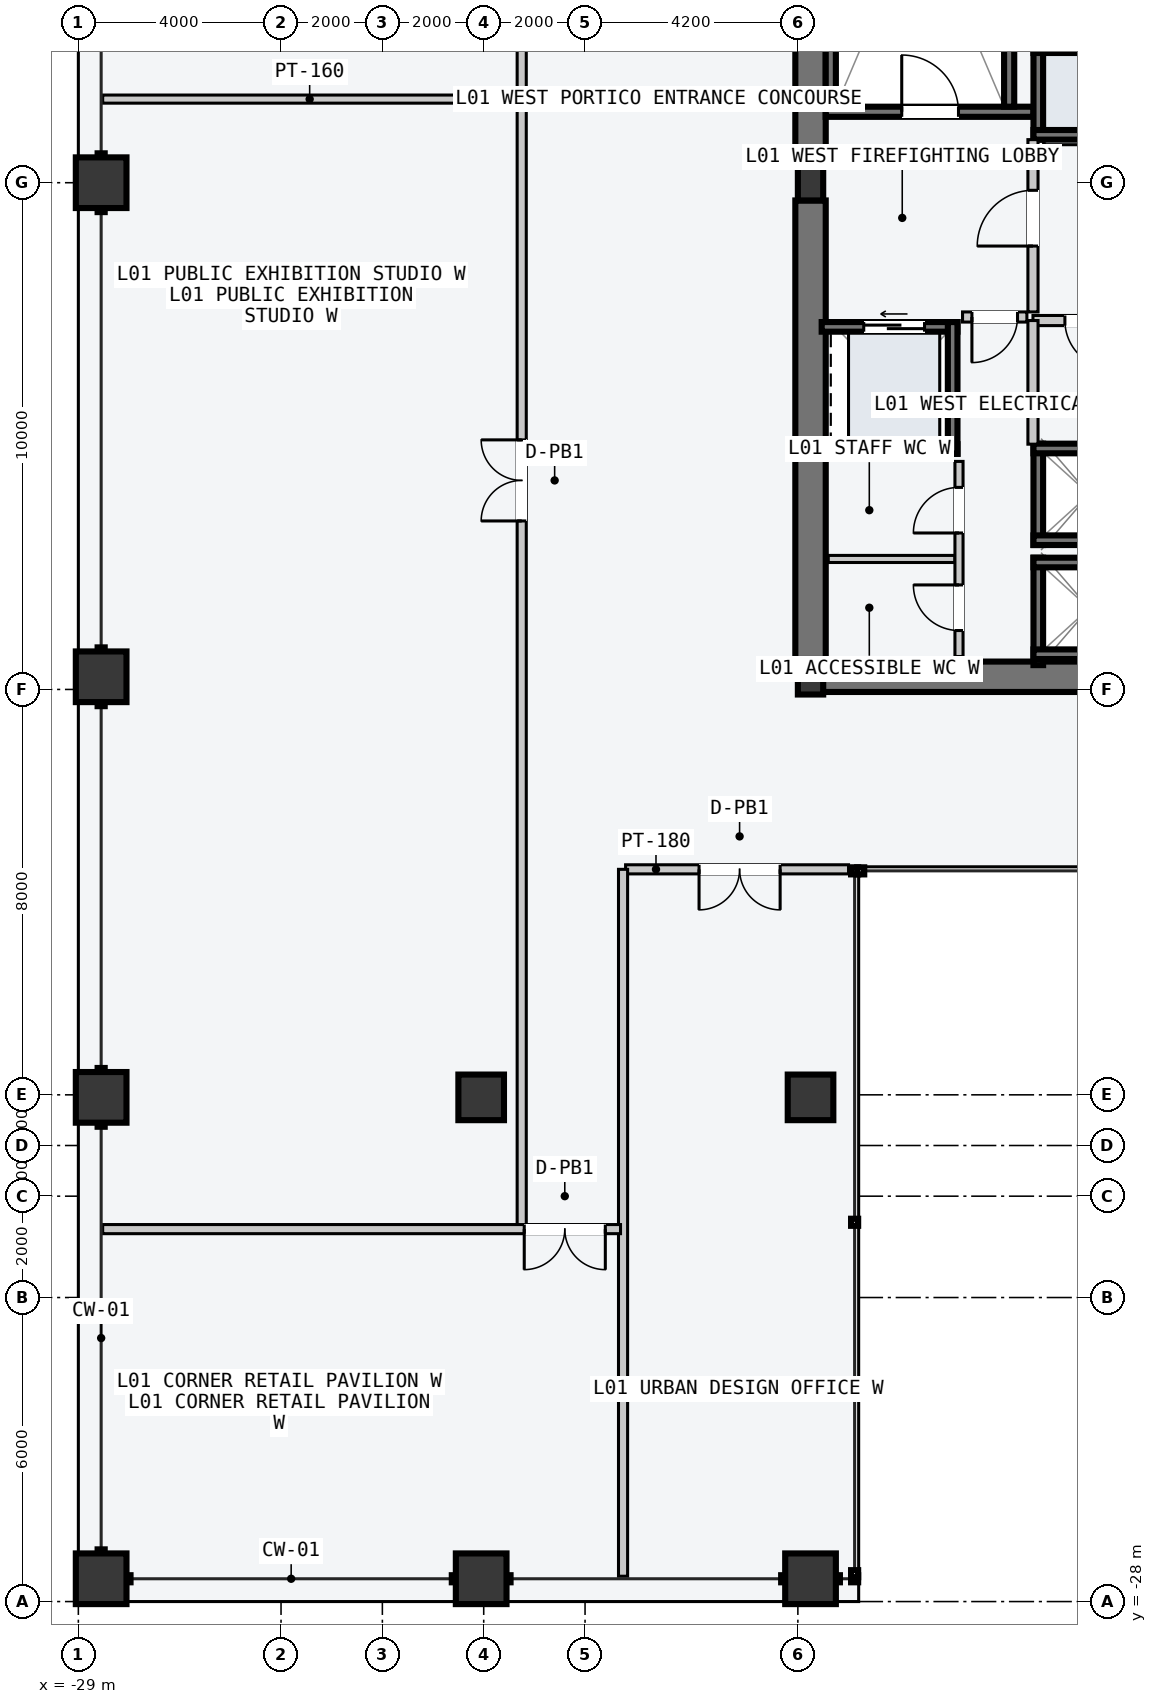
"""IFC4 building model, lengths in metres.
Left out: names, types, materials, properties, quantities, classifications, styles, units other than length and angle.
Written with IfcOpenShell. Run it as: python <this file> out.ifc"""

import sys

from ifc_helpers import new_model, si_unit, direction, frame, frame_2d, origin, origin_2d, place, context, subcontext, project, spatial, rectangle, hollow_rectangle, i_section, extrude, element, fill, save


model = new_model("IFC4")
c1 = context("Model", 3, precision=1e-05, world=origin(), true_north=direction((0.0, 1.0)))
c2 = subcontext(c1, "Body", "Model", "MODEL_VIEW")
j1 = project(units=[si_unit("LENGTHUNIT", "METRE"), si_unit("PLANEANGLEUNIT", "RADIAN")], contexts=[c1])
p1 = place(None, origin())
s1 = spatial("IfcSite", under=j1, at=p1, CompositionType="ELEMENT")
p2 = place(p1, origin())
s2 = spatial("IfcBuilding", under=s1, at=p2, CompositionType="ELEMENT")
p3 = place(p2, frame((0.0, 0.0, 4.8)))
s3 = spatial("IfcBuildingStorey", under=s2, at=p3, CompositionType="ELEMENT", Elevation=4.8)
p4 = place(p3, frame((-14.53, -9.75, -0.22), z_axis=(0.0, 0.0, 1.0), x_axis=(1.0, 0.0, 0.0)))
e1 = element("IfcWall", 1, at=p4, inside=s3, PredefinedType="SHEAR", context=c2, shape_type="SweptSolid", body=[
    extrude(rectangle(XDim=6.46, YDim=0.6, at=frame_2d((3.23, 0.0))), origin(), (0.0, 0.0, 1.0), 4.8),
])
for number, where, z_axis, x_axis in (
    (2, (-14.55, -9.4, -0.22), (0.0, 0.0, 1.0), (0.0, 1.0, 0.0)),
    (3, (-14.55, 0.35, -0.22), (0.0, 0.0, 1.0), (0.0, 1.0, 0.0)),
):
    element("IfcWall", number, at=place(p3, frame(where, z_axis=z_axis, x_axis=x_axis)), inside=s3, PredefinedType="SHEAR", context=c2, shape_type="SweptSolid", body=[
        extrude(rectangle(XDim=9.05, YDim=0.6, at=frame_2d((4.525, 0.0))), origin(), (0.0, 0.0, 1.0), 4.8),
    ])
p5 = place(p3, frame((-14.15, 1.5, -0.22), z_axis=(0.0, 0.0, 1.0), x_axis=(0.0, 1.0, 0.0)))
e4 = element("IfcWall", 4, at=p5, inside=s3, PredefinedType="SOLIDWALL", context=c2, shape_type="SweptSolid", body=[
    extrude(rectangle(XDim=7.8, YDim=0.2, at=frame_2d((3.9, 0.0))), origin(), (0.0, 0.0, 1.0), 4.8),
])
p6 = place(p3, frame((-14.25, 1.4, -0.22), z_axis=(0.0, 0.0, 1.0), x_axis=(1.0, 0.0, 0.0)))
e5 = element("IfcWall", 5, at=p6, inside=s3, PredefinedType="SOLIDWALL", context=c2, shape_type="SweptSolid", body=[
    extrude(rectangle(XDim=4.1, YDim=0.2, at=frame_2d((2.05, 0.0))), origin(), (0.0, 0.0, 1.0), 4.8),
])
p7 = place(p6, frame((1.5, 0.0, 0.22)))
e6 = element("IfcOpeningElement", 6, at=p7, cuts=e5, PredefinedType="OPENING", context=c2, shape_type="SweptSolid", body=[
    extrude(rectangle(XDim=1.12, YDim=2.18, at=frame_2d((0.56, 1.09))), frame((0.0, 0.11, 0.0), z_axis=(0.0, -1.0, 0.0), x_axis=(1.0, 0.0, 0.0)), (0.0, 0.0, 1.0), 0.22),
])
p8 = place(p3, frame((-10.63, 1.5, -0.22), z_axis=(0.0, 0.0, 1.0), x_axis=(0.0, 1.0, 0.0)))
e7 = element("IfcWall", 7, at=p8, inside=s3, PredefinedType="SOLIDWALL", context=c2, shape_type="SweptSolid", body=[
    extrude(rectangle(XDim=7.8, YDim=0.2, at=frame_2d((3.9, 0.0))), origin(), (0.0, 0.0, 1.0), 4.8),
])
for number, where, z_axis, x_axis in (
    (8, (-14.55, -9.75, 0.0), (0.0, 0.0, 1.0), (1.0, 0.0, 0.0)),
    (9, (-14.55, 0.0, 0.0), (0.0, 0.0, 1.0), (1.0, 0.0, 0.0)),
):
    element("IfcColumn", number, at=place(p3, frame(where, z_axis=z_axis, x_axis=x_axis)), inside=s3, PredefinedType="COLUMN", context=c2, shape_type="SweptSolid", body=[
        extrude(i_section(OverallWidth=0.5, OverallDepth=0.7, WebThickness=0.028, FlangeThickness=0.045, at=origin_2d()), origin(), (0.0, 0.0, 1.0), 4.8),
    ])
for number, where, z_axis, x_axis in (
    (10, (-21.05, -18.05, 0.0), (0.0, 0.0, 1.0), (1.0, 0.0, 0.0)),
    (11, (-14.55, -18.05, 0.0), (0.0, 0.0, 1.0), (1.0, 0.0, 0.0)),
):
    element("IfcColumn", number, at=place(p3, frame(where, z_axis=z_axis, x_axis=x_axis)), inside=s3, PredefinedType="COLUMN", context=c2, shape_type="SweptSolid", body=[
        extrude(hollow_rectangle(XDim=0.9, YDim=0.9, WallThickness=0.045, at=origin_2d()), origin(), (0.0, 0.0, 1.0), 4.8),
    ])
for number, where, z_axis, x_axis in (
    (12, (-28.55, -27.55, 0.0), (0.0, 0.0, 1.0), (1.0, 0.0, 0.0)),
    (13, (-21.05, -27.55, 0.0), (0.0, 0.0, 1.0), (1.0, 0.0, 0.0)),
    (14, (-14.55, -27.55, 0.0), (0.0, 0.0, 1.0), (1.0, 0.0, 0.0)),
    (15, (-28.55, -18.05, 0.0), (0.0, 0.0, 1.0), (0.0, 1.0, 0.0)),
    (16, (-28.55, -9.75, 0.0), (0.0, 0.0, 1.0), (0.0, 1.0, 0.0)),
    (17, (-28.55, 0.0, 0.0), (0.0, 0.0, 1.0), (0.0, 1.0, 0.0)),
):
    element("IfcColumn", number, at=place(p3, frame(where, z_axis=z_axis, x_axis=x_axis)), inside=s3, PredefinedType="COLUMN", context=c2, shape_type="SweptSolid", body=[
        extrude(hollow_rectangle(XDim=1.0, YDim=1.0, WallThickness=0.05, at=origin_2d()), origin(), (0.0, 0.0, 1.0), 4.8),
    ])
p9 = place(p3, frame((-10.055, 0.85, -0.22), z_axis=(0.0, 0.0, 1.0), x_axis=(0.0, 1.0, 0.0)))
e18 = element("IfcWall", 18, at=p9, inside=s3, PredefinedType="SOLIDWALL", context=c2, shape_type="SweptSolid", body=[
    extrude(rectangle(XDim=1.9, YDim=0.19, at=frame_2d((0.95, 0.0))), origin(), (0.0, 0.0, 1.0), 4.8),
])
for number, where, z_axis, x_axis in (
    (19, (-10.15, 2.655, -0.22), (0.0, 0.0, 1.0), (1.0, 0.0, 0.0)),
    (20, (-10.15, 0.945, -0.22), (0.0, 0.0, 1.0), (1.0, 0.0, 0.0)),
):
    element("IfcWall", number, at=place(p3, frame(where, z_axis=z_axis, x_axis=x_axis)), inside=s3, PredefinedType="SOLIDWALL", context=c2, shape_type="SweptSolid", body=[
        extrude(rectangle(XDim=2.2, YDim=0.19, at=frame_2d((1.1, 0.0))), origin(), (0.0, 0.0, 1.0), 4.8),
    ])
p10 = place(p3, frame((-10.055, -9.52, -0.22), z_axis=(0.0, 0.0, 1.0), x_axis=(0.0, 1.0, 0.0)))
e21 = element("IfcWall", 21, at=p10, inside=s3, PredefinedType="SOLIDWALL", context=c2, shape_type="SweptSolid", body=[
    extrude(rectangle(XDim=2.12, YDim=0.19, at=frame_2d((1.06, 0.0))), origin(), (0.0, 0.0, 1.0), 4.8),
])
for number, where, z_axis, x_axis in (
    (22, (-10.15, -7.495, -0.22), (0.0, 0.0, 1.0), (1.0, 0.0, 0.0)),
    (23, (-10.15, -9.305, -0.22), (0.0, 0.0, 1.0), (1.0, 0.0, 0.0)),
):
    element("IfcWall", number, at=place(p3, frame(where, z_axis=z_axis, x_axis=x_axis)), inside=s3, PredefinedType="SOLIDWALL", context=c2, shape_type="SweptSolid", body=[
        extrude(rectangle(XDim=2.2, YDim=0.19, at=frame_2d((1.1, 0.0))), origin(), (0.0, 0.0, 1.0), 4.8),
    ])
p11 = place(p3, frame((-10.055, -7.15, -0.22), z_axis=(0.0, 0.0, 1.0), x_axis=(0.0, 1.0, 0.0)))
e24 = element("IfcWall", 24, at=p11, inside=s3, PredefinedType="SOLIDWALL", context=c2, shape_type="SweptSolid", body=[
    extrude(rectangle(XDim=2.0, YDim=0.19, at=frame_2d((1.0, 0.0))), origin(), (0.0, 0.0, 1.0), 4.8),
])
for number, where, z_axis, x_axis in (
    (25, (-10.15, -5.245, -0.22), (0.0, 0.0, 1.0), (1.0, 0.0, 0.0)),
    (26, (-10.15, -7.055, -0.22), (0.0, 0.0, 1.0), (1.0, 0.0, 0.0)),
):
    element("IfcWall", number, at=place(p3, frame(where, z_axis=z_axis, x_axis=x_axis)), inside=s3, PredefinedType="SOLIDWALL", context=c2, shape_type="SweptSolid", body=[
        extrude(rectangle(XDim=2.2, YDim=0.19, at=frame_2d((1.1, 0.0))), origin(), (0.0, 0.0, 1.0), 4.8),
    ])
p12 = place(p3, frame((-14.33, -2.845, -0.22), z_axis=(0.0, 0.0, 1.0), x_axis=(1.0, 0.0, 0.0)))
e27 = element("IfcWall", 27, at=p12, inside=s3, PredefinedType="SOLIDWALL", context=c2, shape_type="SweptSolid", body=[
    extrude(rectangle(XDim=2.68, YDim=0.19, at=frame_2d((1.34, 0.0))), origin(), (0.0, 0.0, 1.0), 4.8),
])
p13 = place(p12, frame((0.83, 0.0, 0.22)))
e28 = element("IfcOpeningElement", 28, at=p13, cuts=e27, PredefinedType="OPENING", context=c2, shape_type="SweptSolid", body=[
    extrude(rectangle(XDim=1.2, YDim=2.2, at=frame_2d((0.6, 1.1))), frame((0.0, 0.105, 0.0), z_axis=(0.0, -1.0, 0.0), x_axis=(1.0, 0.0, 0.0)), (0.0, 0.0, 1.0), 0.21),
])
p14 = place(p3, frame((-14.33, -5.255, -0.22), z_axis=(0.0, 0.0, 1.0), x_axis=(1.0, 0.0, 0.0)))
e29 = element("IfcWall", 29, at=p14, inside=s3, PredefinedType="SOLIDWALL", context=c2, shape_type="SweptSolid", body=[
    extrude(rectangle(XDim=2.68, YDim=0.19, at=frame_2d((1.34, 0.0))), origin(), (0.0, 0.0, 1.0), 4.8),
])
p15 = place(p3, frame((-11.745, -5.35, -0.22), z_axis=(0.0, 0.0, 1.0), x_axis=(0.0, 1.0, 0.0)))
e30 = element("IfcWall", 30, at=p15, inside=s3, PredefinedType="SOLIDWALL", context=c2, shape_type="SweptSolid", body=[
    extrude(rectangle(XDim=2.6, YDim=0.19, at=frame_2d((1.3, 0.0))), origin(), (0.0, 0.0, 1.0), 4.8),
])
p16 = place(p3, frame((-10.16, -2.55, 0.0), z_axis=(0.0, 0.0, 1.0), x_axis=(0.0, 1.0, 0.0)))
e31 = element("IfcWall", 31, at=p16, inside=s3, PredefinedType="PARTITIONING", context=c2, shape_type="SweptSolid", body=[
    extrude(rectangle(XDim=3.4, YDim=0.2, at=frame_2d((1.7, 0.0))), origin(), (0.0, 0.0, 1.0), 4.58),
])
p17 = place(p16, frame((1.3, 0.0, 0.0)))
e32 = element("IfcOpeningElement", 32, at=p17, cuts=e31, PredefinedType="OPENING", context=c2, shape_type="SweptSolid", body=[
    extrude(rectangle(XDim=1.1, YDim=2.15, at=frame_2d((0.55, 1.075))), frame((0.0, 0.11, 0.0), z_axis=(0.0, -1.0, 0.0), x_axis=(1.0, 0.0, 0.0)), (0.0, 0.0, 1.0), 0.22),
])
p18 = place(p3, frame((-10.28, -2.65, 0.0), z_axis=(0.0, 0.0, 1.0), x_axis=(-1.0, 0.0, 0.0)))
e33 = element("IfcWall", 33, at=p18, inside=s3, PredefinedType="PARTITIONING", context=c2, shape_type="SweptSolid", body=[
    extrude(rectangle(XDim=1.27, YDim=0.2, at=frame_2d((0.635, 0.0))), origin(), (0.0, 0.0, 1.0), 4.58),
])
p19 = place(p18, frame((0.185, 0.0, 0.0)))
e34 = element("IfcOpeningElement", 34, at=p19, cuts=e33, PredefinedType="OPENING", context=c2, shape_type="SweptSolid", body=[
    extrude(rectangle(XDim=0.9, YDim=2.15, at=frame_2d((0.45, 1.075))), frame((0.0, 0.11, 0.0), z_axis=(0.0, -1.0, 0.0), x_axis=(1.0, 0.0, 0.0)), (0.0, 0.0, 1.0), 0.22),
])
p20 = place(p3, frame((-7.96, -2.72, 0.0), z_axis=(0.0, 0.0, 1.0), x_axis=(-1.0, 0.0, 0.0)))
e35 = element("IfcWall", 35, at=p20, inside=s3, PredefinedType="PARTITIONING", context=c2, shape_type="SweptSolid", body=[
    extrude(rectangle(XDim=2.2, YDim=0.2, at=frame_2d((1.1, 0.0))), origin(), (0.0, 0.0, 1.0), 4.58),
])
p21 = place(p20, frame((0.62, 0.0, 0.0)))
e36 = element("IfcOpeningElement", 36, at=p21, cuts=e35, PredefinedType="OPENING", context=c2, shape_type="SweptSolid", body=[
    extrude(rectangle(XDim=0.95, YDim=2.1, at=frame_2d((0.475, 1.05))), frame((0.0, 0.11, 0.0), z_axis=(0.0, -1.0, 0.0), x_axis=(1.0, 0.0, 0.0)), (0.0, 0.0, 1.0), 0.22),
])
p22 = place(p3, frame((-10.16, -5.16, 0.0), z_axis=(0.0, 0.0, 1.0), x_axis=(0.0, 1.0, 0.0)))
e37 = element("IfcWall", 37, at=p22, inside=s3, PredefinedType="PARTITIONING", context=c2, shape_type="SweptSolid", body=[
    extrude(rectangle(XDim=2.44, YDim=0.2, at=frame_2d((1.22, 0.0))), origin(), (0.0, 0.0, 1.0), 4.58),
])
p23 = place(p3, frame((-11.7, -7.425, 0.0), z_axis=(0.0, 0.0, 1.0), x_axis=(-1.0, 0.0, 0.0)))
e38 = element("IfcWall", 38, at=p23, inside=s3, PredefinedType="PARTITIONING", context=c2, shape_type="SweptSolid", body=[
    extrude(rectangle(XDim=2.5, YDim=0.14, at=frame_2d((1.25, 0.0))), origin(), (0.0, 0.0, 1.0), 4.58),
])
p24 = place(p3, frame((-11.62, -9.35, 0.0), z_axis=(0.0, 0.0, 1.0), x_axis=(0.0, 1.0, 0.0)))
e39 = element("IfcWall", 39, at=p24, inside=s3, PredefinedType="PARTITIONING", context=c2, shape_type="SweptSolid", body=[
    extrude(rectangle(XDim=3.85, YDim=0.16, at=frame_2d((1.925, 0.0))), origin(), (0.0, 0.0, 1.0), 4.58),
])
p25 = place(p24, frame((0.512, 0.0, 0.0)))
e40 = element("IfcOpeningElement", 40, at=p25, cuts=e39, PredefinedType="OPENING", context=c2, shape_type="SweptSolid", body=[
    extrude(rectangle(XDim=0.9, YDim=2.15, at=frame_2d((0.45, 1.075))), frame((0.0, 0.09, 0.0), z_axis=(0.0, -1.0, 0.0), x_axis=(1.0, 0.0, 0.0)), (0.0, 0.0, 1.0), 0.18),
])
p26 = place(p24, frame((2.438, 0.0, 0.0)))
e41 = element("IfcOpeningElement", 41, at=p26, cuts=e39, PredefinedType="OPENING", context=c2, shape_type="SweptSolid", body=[
    extrude(rectangle(XDim=0.9, YDim=2.15, at=frame_2d((0.45, 1.075))), frame((0.0, 0.09, 0.0), z_axis=(0.0, -1.0, 0.0), x_axis=(1.0, 0.0, 0.0)), (0.0, 0.0, 1.0), 0.18),
])
p27 = place(p3, frame((-20.35, 1.65, 0.0), z_axis=(0.0, 0.0, 1.0), x_axis=(-1.0, 0.0, 0.0)))
e42 = element("IfcWall", 42, at=p27, inside=s3, PredefinedType="PARTITIONING", context=c2, shape_type="SweptSolid", body=[
    extrude(rectangle(XDim=8.17, YDim=0.16, at=frame_2d((4.085, 0.0))), origin(), (0.0, 0.0, 1.0), 4.58),
])
p28 = place(p3, frame((-20.25, -20.6, 0.0), z_axis=(0.0, 0.0, 1.0), x_axis=(0.0, 1.0, 0.0)))
e43 = element("IfcWall", 43, at=p28, inside=s3, PredefinedType="PARTITIONING", context=c2, shape_type="SweptSolid", body=[
    extrude(rectangle(XDim=37.3, YDim=0.18, at=frame_2d((18.65, 0.0))), origin(), (0.0, 0.0, 1.0), 4.58),
])
p29 = place(p28, frame((13.925, 0.0, 0.0)))
e44 = element("IfcOpeningElement", 44, at=p29, cuts=e43, PredefinedType="OPENING", context=c2, shape_type="SweptSolid", body=[
    extrude(rectangle(XDim=1.6, YDim=2.3, at=frame_2d((0.8, 1.15))), frame((0.0, 0.1, 0.0), z_axis=(0.0, -1.0, 0.0), x_axis=(1.0, 0.0, 0.0)), (0.0, 0.0, 1.0), 0.2),
])
p30 = place(p28, frame((28.975, 0.0, 0.0)))
e45 = element("IfcOpeningElement", 45, at=p30, cuts=e43, PredefinedType="OPENING", context=c2, shape_type="SweptSolid", body=[
    extrude(rectangle(XDim=1.6, YDim=2.3, at=frame_2d((0.8, 1.15))), frame((0.0, 0.1, 0.0), z_axis=(0.0, -1.0, 0.0), x_axis=(1.0, 0.0, 0.0)), (0.0, 0.0, 1.0), 0.2),
])
p31 = place(p3, frame((-13.8, -13.55, 0.0), z_axis=(0.0, 0.0, 1.0), x_axis=(-1.0, 0.0, 0.0)))
e46 = element("IfcWall", 46, at=p31, inside=s3, PredefinedType="PARTITIONING", context=c2, shape_type="SweptSolid", body=[
    extrude(rectangle(XDim=4.4, YDim=0.18, at=frame_2d((2.2, 0.0))), origin(), (0.0, 0.0, 1.0), 4.58),
])
p32 = place(p31, frame((1.35, 0.0, 0.0)))
e47 = element("IfcOpeningElement", 47, at=p32, cuts=e46, PredefinedType="OPENING", context=c2, shape_type="SweptSolid", body=[
    extrude(rectangle(XDim=1.6, YDim=2.3, at=frame_2d((0.8, 1.15))), frame((0.0, 0.1, 0.0), z_axis=(0.0, -1.0, 0.0), x_axis=(1.0, 0.0, 0.0)), (0.0, 0.0, 1.0), 0.2),
])
p33 = place(p3, frame((-18.25, -27.5, 0.0), z_axis=(0.0, 0.0, 1.0), x_axis=(0.0, 1.0, 0.0)))
e48 = element("IfcWall", 48, at=p33, inside=s3, PredefinedType="PARTITIONING", context=c2, shape_type="SweptSolid", body=[
    extrude(rectangle(XDim=13.95, YDim=0.18, at=frame_2d((6.975, 0.0))), origin(), (0.0, 0.0, 1.0), 4.58),
])
p34 = place(p3, frame((-18.3, -20.65, 0.0), z_axis=(0.0, 0.0, 1.0), x_axis=(-1.0, 0.0, 0.0)))
e49 = element("IfcWall", 49, at=p34, inside=s3, PredefinedType="PARTITIONING", context=c2, shape_type="SweptSolid", body=[
    extrude(rectangle(XDim=10.22, YDim=0.18, at=frame_2d((5.11, 0.0))), origin(), (0.0, 0.0, 1.0), 4.58),
])
p35 = place(p34, frame((0.3, 0.0, 0.0)))
e50 = element("IfcOpeningElement", 50, at=p35, cuts=e49, PredefinedType="OPENING", context=c2, shape_type="SweptSolid", body=[
    extrude(rectangle(XDim=1.6, YDim=2.3, at=frame_2d((0.8, 1.15))), frame((0.0, 0.1, 0.0), z_axis=(0.0, -1.0, 0.0), x_axis=(1.0, 0.0, 0.0)), (0.0, 0.0, 1.0), 0.2),
])
p36 = place(p7, origin())
e51 = element("IfcDoor", 51, at=p36, inside=s3, OperationType="SINGLE_SWING_LEFT", PredefinedType="DOOR", context=c2, shape_type="SweptSolid", body=[
    extrude(rectangle(XDim=1.12, YDim=2.18, at=frame_2d((0.56, 1.09))), frame((0.0, 0.025, 0.0), z_axis=(0.0, -1.0, 0.0), x_axis=(1.0, 0.0, 0.0)), (0.0, 0.0, 1.0), 0.05),
])
fill(e6, e51)
p37 = place(p13, origin())
e52 = element("IfcDoor", 52, at=p37, inside=s3, OperationType="SLIDING_TO_LEFT", PredefinedType="DOOR", context=c2, shape_type="SweptSolid", body=[
    extrude(rectangle(XDim=1.2, YDim=2.2, at=frame_2d((0.6, 1.1))), frame((0.0, 0.025, 0.0), z_axis=(0.0, -1.0, 0.0), x_axis=(1.0, 0.0, 0.0)), (0.0, 0.0, 1.0), 0.05),
])
fill(e28, e52)
p38 = place(p17, origin())
e53 = element("IfcDoor", 53, at=p38, inside=s3, OperationType="SINGLE_SWING_LEFT", PredefinedType="DOOR", context=c2, shape_type="SweptSolid", body=[
    extrude(rectangle(XDim=1.1, YDim=2.15, at=frame_2d((0.55, 1.075))), frame((0.0, 0.025, 0.0), z_axis=(0.0, -1.0, 0.0), x_axis=(1.0, 0.0, 0.0)), (0.0, 0.0, 1.0), 0.05),
])
fill(e32, e53)
p39 = place(p19, origin())
e54 = element("IfcDoor", 54, at=p39, inside=s3, OperationType="SINGLE_SWING_RIGHT", PredefinedType="DOOR", context=c2, shape_type="SweptSolid", body=[
    extrude(rectangle(XDim=0.9, YDim=2.15, at=frame_2d((0.45, 1.075))), frame((0.0, 0.025, 0.0), z_axis=(0.0, -1.0, 0.0), x_axis=(1.0, 0.0, 0.0)), (0.0, 0.0, 1.0), 0.05),
])
fill(e34, e54)
p40 = place(p21, origin())
e55 = element("IfcDoor", 55, at=p40, inside=s3, OperationType="SINGLE_SWING_LEFT", PredefinedType="DOOR", context=c2, shape_type="SweptSolid", body=[
    extrude(rectangle(XDim=0.95, YDim=2.1, at=frame_2d((0.475, 1.05))), frame((0.0, 0.025, 0.0), z_axis=(0.0, -1.0, 0.0), x_axis=(1.0, 0.0, 0.0)), (0.0, 0.0, 1.0), 0.05),
])
fill(e36, e55)
p41 = place(p25, origin())
e56 = element("IfcDoor", 56, at=p41, inside=s3, OperationType="SINGLE_SWING_RIGHT", PredefinedType="DOOR", context=c2, shape_type="SweptSolid", body=[
    extrude(rectangle(XDim=0.9, YDim=2.15, at=frame_2d((0.45, 1.075))), frame((0.0, 0.025, 0.0), z_axis=(0.0, -1.0, 0.0), x_axis=(1.0, 0.0, 0.0)), (0.0, 0.0, 1.0), 0.05),
])
fill(e40, e56)
p42 = place(p26, origin())
e57 = element("IfcDoor", 57, at=p42, inside=s3, OperationType="SINGLE_SWING_LEFT", PredefinedType="DOOR", context=c2, shape_type="SweptSolid", body=[
    extrude(rectangle(XDim=0.9, YDim=2.15, at=frame_2d((0.45, 1.075))), frame((0.0, 0.025, 0.0), z_axis=(0.0, -1.0, 0.0), x_axis=(1.0, 0.0, 0.0)), (0.0, 0.0, 1.0), 0.05),
])
fill(e41, e57)
p43 = place(p29, origin())
e58 = element("IfcDoor", 58, at=p43, inside=s3, OperationType="DOUBLE_DOOR_SINGLE_SWING", PredefinedType="DOOR", context=c2, shape_type="SweptSolid", body=[
    extrude(rectangle(XDim=1.6, YDim=2.3, at=frame_2d((0.8, 1.15))), frame((0.0, 0.025, 0.0), z_axis=(0.0, -1.0, 0.0), x_axis=(1.0, 0.0, 0.0)), (0.0, 0.0, 1.0), 0.05),
])
fill(e44, e58)
p44 = place(p32, origin())
e59 = element("IfcDoor", 59, at=p44, inside=s3, OperationType="DOUBLE_DOOR_SINGLE_SWING", PredefinedType="DOOR", context=c2, shape_type="SweptSolid", body=[
    extrude(rectangle(XDim=1.6, YDim=2.3, at=frame_2d((0.8, 1.15))), frame((0.0, 0.025, 0.0), z_axis=(0.0, -1.0, 0.0), x_axis=(1.0, 0.0, 0.0)), (0.0, 0.0, 1.0), 0.05),
])
fill(e47, e59)
p45 = place(p35, origin())
e60 = element("IfcDoor", 60, at=p45, inside=s3, OperationType="DOUBLE_DOOR_SINGLE_SWING", PredefinedType="DOOR", context=c2, shape_type="SweptSolid", body=[
    extrude(rectangle(XDim=1.6, YDim=2.3, at=frame_2d((0.8, 1.15))), frame((0.0, 0.025, 0.0), z_axis=(0.0, -1.0, 0.0), x_axis=(1.0, 0.0, 0.0)), (0.0, 0.0, 1.0), 0.05),
])
fill(e50, e60)
save(model, sys.argv[1])
